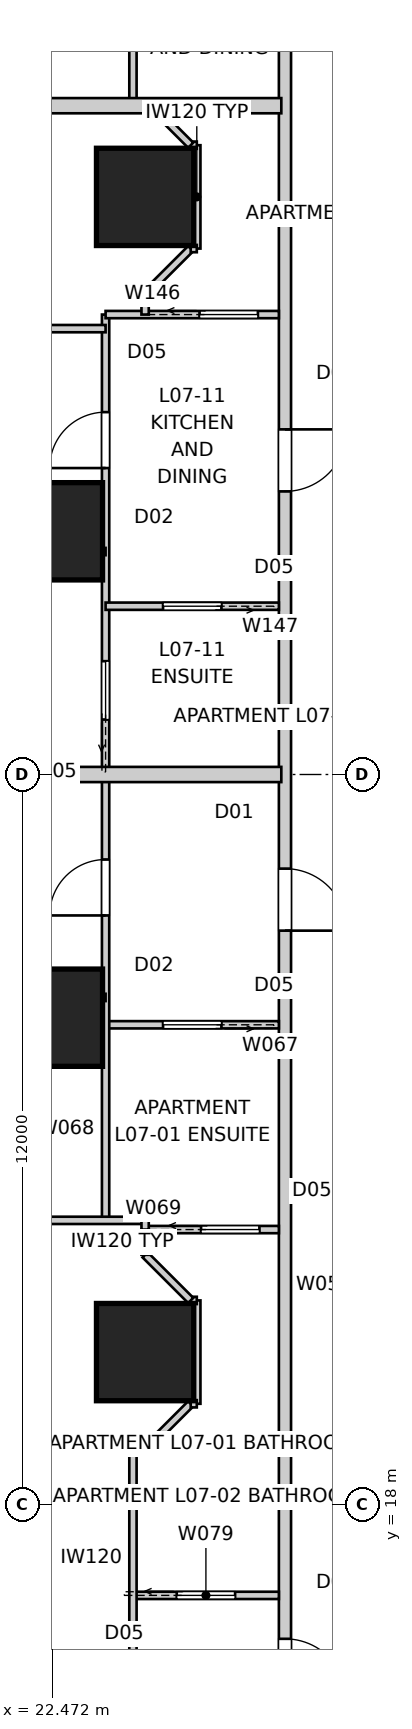
"""IFC4 building model, lengths in metres.
Left out: names, types, materials, properties, quantities, classifications, styles, units other than length and angle.
Written with IfcOpenShell. Run it as: python <this file> out.ifc"""

import sys

from ifc_helpers import new_model, si_unit, direction, frame, frame_2d, origin, origin_2d, place, context, subcontext, project, spatial, rectangle, extrude, element, fill, save


model = new_model("IFC4")
c1 = context("Model", 3, precision=1e-05, world=origin(), true_north=direction((0.0, 1.0)))
c2 = subcontext(c1, "Body", "Model", "MODEL_VIEW")
j1 = project(units=[si_unit("LENGTHUNIT", "METRE"), si_unit("PLANEANGLEUNIT", "RADIAN")], contexts=[c1])
p1 = place(None, origin())
s1 = spatial("IfcSite", under=j1, at=p1, CompositionType="ELEMENT")
p2 = place(p1, origin())
s2 = spatial("IfcBuilding", under=s1, at=p2, CompositionType="ELEMENT")
p3 = place(p2, frame((0.0, 0.0, 28.6)))
s3 = spatial("IfcBuildingStorey", under=s2, at=p3, CompositionType="ELEMENT", Elevation=28.6)
for number, where, z_axis, x_axis in (
    (1, (24.0, 39.5, 0.0), (0.0, 0.0, 1.0), (1.0, 0.0, 0.0)),
    (2, (22.5, 34.0, 0.0), (0.0, 0.0, 1.0), (1.0, 0.0, 0.0)),
    (3, (22.5, 26.0, 0.0), (0.0, 0.0, 1.0), (1.0, 0.0, 0.0)),
    (4, (24.0, 20.5, 0.0), (0.0, 0.0, 1.0), (1.0, 0.0, 0.0)),
):
    element("IfcColumn", number, at=place(p3, frame(where, z_axis=z_axis, x_axis=x_axis)), inside=s3, PredefinedType="COLUMN", context=c2, shape_type="SweptSolid", body=[
        extrude(rectangle(XDim=1.6, YDim=1.6, at=origin_2d()), origin(), (0.0, 0.0, 1.0), 3.4),
    ])
p4 = place(p3, frame((26.3, 46.3, 0.0), z_axis=(0.0, 0.0, 1.0), x_axis=(0.0, -1.0, 0.0)))
e5 = element("IfcWall", 5, at=p4, inside=s3, PredefinedType="PARTITIONING", context=c2, shape_type="SweptSolid", body=[
    extrude(rectangle(XDim=32.6, YDim=0.2, at=frame_2d((16.3, 0.0))), origin(), (0.0, 0.0, 1.0), 3.25),
])
p5 = place(p4, frame((2.315, 0.0, 0.0)))
e6 = element("IfcOpeningElement", 6, at=p5, cuts=e5, PredefinedType="OPENING", context=c2, shape_type="SweptSolid", body=[
    extrude(rectangle(XDim=1.02, YDim=2.34, at=frame_2d((0.51, 1.17))), frame((0.0, 0.11, 0.0), z_axis=(0.0, -1.0, 0.0), x_axis=(1.0, 0.0, 0.0)), (0.0, 0.0, 1.0), 0.22),
])
p6 = place(p4, frame((10.624, 0.0, 0.0)))
e7 = element("IfcOpeningElement", 7, at=p6, cuts=e5, PredefinedType="OPENING", context=c2, shape_type="SweptSolid", body=[
    extrude(rectangle(XDim=1.02, YDim=2.34, at=frame_2d((0.51, 1.17))), frame((0.0, 0.11, 0.0), z_axis=(0.0, -1.0, 0.0), x_axis=(1.0, 0.0, 0.0)), (0.0, 0.0, 1.0), 0.22),
])
p7 = place(p4, frame((17.848, 0.0, 0.0)))
e8 = element("IfcOpeningElement", 8, at=p7, cuts=e5, PredefinedType="OPENING", context=c2, shape_type="SweptSolid", body=[
    extrude(rectangle(XDim=1.02, YDim=2.34, at=frame_2d((0.51, 1.17))), frame((0.0, 0.11, 0.0), z_axis=(0.0, -1.0, 0.0), x_axis=(1.0, 0.0, 0.0)), (0.0, 0.0, 1.0), 0.22),
])
p8 = place(p4, frame((30.516, 0.0, 0.0)))
e9 = element("IfcOpeningElement", 9, at=p8, cuts=e5, PredefinedType="OPENING", context=c2, shape_type="SweptSolid", body=[
    extrude(rectangle(XDim=1.02, YDim=2.34, at=frame_2d((0.51, 1.17))), frame((0.0, 0.11, 0.0), z_axis=(0.0, -1.0, 0.0), x_axis=(1.0, 0.0, 0.0)), (0.0, 0.0, 1.0), 0.22),
])
for number, where, z_axis, x_axis in (
    (10, (14.0, 41.0, 0.0), (0.0, 0.0, 1.0), (1.0, 0.0, 0.0)),
    (11, (14.0, 19.0, 0.0), (0.0, 0.0, 1.0), (1.0, 0.0, 0.0)),
):
    element("IfcWall", number, at=place(p3, frame(where, z_axis=z_axis, x_axis=x_axis)), inside=s3, PredefinedType="PARTITIONING", context=c2, shape_type="SweptSolid", body=[
        extrude(rectangle(XDim=12.24, YDim=0.25, at=frame_2d((6.12, 0.0))), origin(), (0.0, 0.0, 1.0), 3.25),
    ])
p9 = place(p3, frame((14.0, 30.0, 0.0), z_axis=(0.0, 0.0, 1.0), x_axis=(1.0, 0.0, 0.0)))
e12 = element("IfcWall", 12, at=p9, inside=s3, PredefinedType="PARTITIONING", context=c2, shape_type="SweptSolid", body=[
    extrude(rectangle(XDim=8.5, YDim=0.25, at=frame_2d((4.25, 0.0))), origin(), (0.0, 0.0, 1.0), 3.25),
])
p10 = place(p3, frame((22.5, 30.0, 0.0), z_axis=(0.0, 0.0, 1.0), x_axis=(1.0, 0.0, 0.0)))
e13 = element("IfcWall", 13, at=p10, inside=s3, PredefinedType="PARTITIONING", context=c2, shape_type="SweptSolid", body=[
    extrude(rectangle(XDim=3.74, YDim=0.25, at=frame_2d((1.87, 0.0))), origin(), (0.0, 0.0, 1.0), 2.796),
])
p11 = place(p3, frame((26.2, 25.884, 0.0), z_axis=(0.0, 0.0, 1.0), x_axis=(-1.0, 0.0, 0.0)))
e14 = element("IfcWall", 14, at=p11, inside=s3, PredefinedType="PARTITIONING", context=c2, shape_type="SweptSolid", body=[
    extrude(rectangle(XDim=2.85, YDim=0.12, at=frame_2d((1.425, 0.0))), origin(), (0.0, 0.0, 1.0), 3.25),
])
p12 = place(p11, frame((0.945, 0.0, 0.0)))
e15 = element("IfcOpeningElement", 15, at=p12, cuts=e14, PredefinedType="OPENING", context=c2, shape_type="SweptSolid", body=[
    extrude(rectangle(XDim=0.96, YDim=2.1, at=frame_2d((0.48, 1.05))), frame((0.0, 0.07, 0.0), z_axis=(0.0, -1.0, 0.0), x_axis=(1.0, 0.0, 0.0)), (0.0, 0.0, 1.0), 0.14),
])
p13 = place(p3, frame((23.35, 22.667, 0.0), z_axis=(0.0, 0.0, 1.0), x_axis=(0.0, 1.0, 0.0)))
e16 = element("IfcWall", 16, at=p13, inside=s3, PredefinedType="PARTITIONING", context=c2, shape_type="SweptSolid", body=[
    extrude(rectangle(XDim=14.898, YDim=0.12, at=frame_2d((7.449, 0.0))), origin(), (0.0, 0.0, 1.0), 2.55),
])
p14 = place(p13, frame((12.373, 0.0, 0.0)))
e17 = element("IfcOpeningElement", 17, at=p14, cuts=e16, PredefinedType="OPENING", context=c2, shape_type="SweptSolid", body=[
    extrude(rectangle(XDim=0.92, YDim=2.34, at=frame_2d((0.46, 1.17))), frame((0.0, 0.07, 0.0), z_axis=(0.0, -1.0, 0.0), x_axis=(1.0, 0.0, 0.0)), (0.0, 0.0, 1.0), 0.14),
])
p15 = place(p13, frame((5.015, 0.0, 0.0)))
e18 = element("IfcOpeningElement", 18, at=p15, cuts=e16, PredefinedType="OPENING", context=c2, shape_type="SweptSolid", body=[
    extrude(rectangle(XDim=0.92, YDim=2.34, at=frame_2d((0.46, 1.17))), frame((0.0, 0.07, 0.0), z_axis=(0.0, -1.0, 0.0), x_axis=(1.0, 0.0, 0.0)), (0.0, 0.0, 1.0), 0.14),
])
p16 = place(p13, frame((8.237, 0.0, 0.0)))
e19 = element("IfcOpeningElement", 19, at=p16, cuts=e16, PredefinedType="OPENING", context=c2, shape_type="SweptSolid", body=[
    extrude(rectangle(XDim=0.96, YDim=2.1, at=frame_2d((0.48, 1.05))), frame((0.0, 0.07, 0.0), z_axis=(0.0, -1.0, 0.0), x_axis=(1.0, 0.0, 0.0)), (0.0, 0.0, 1.0), 0.14),
])
p17 = place(p3, frame((24.0, 22.515, 0.0), z_axis=(0.0, 0.0, 1.0), x_axis=(1.0, 0.0, 0.0)))
e20 = element("IfcWall", 20, at=p17, inside=s3, PredefinedType="PARTITIONING", context=c2, shape_type="SweptSolid", body=[
    extrude(rectangle(XDim=2.2, YDim=0.12, at=frame_2d((1.1, 0.0))), origin(), (0.0, 0.0, 1.0), 3.25),
])
p18 = place(p17, frame((0.92, 0.0, 0.0)))
e21 = element("IfcOpeningElement", 21, at=p18, cuts=e20, PredefinedType="OPENING", context=c2, shape_type="SweptSolid", body=[
    extrude(rectangle(XDim=0.96, YDim=2.1, at=frame_2d((0.48, 1.05))), frame((0.0, 0.07, 0.0), z_axis=(0.0, -1.0, 0.0), x_axis=(1.0, 0.0, 0.0)), (0.0, 0.0, 1.0), 0.14),
])
p19 = place(p3, frame((24.1, 19.0, 0.0), z_axis=(0.0, 0.0, 1.0), x_axis=(0.707106781187, 0.707106781187, 0.0)))
e22 = element("IfcWall", 22, at=p19, inside=s3, PredefinedType="PARTITIONING", context=c2, shape_type="SweptSolid", body=[
    extrude(rectangle(XDim=0.919, YDim=0.12, at=frame_2d((0.459, 0.0))), origin(), (0.0, 0.0, 1.0), 3.25),
])
p20 = place(p3, frame((24.85, 19.65, 0.0), z_axis=(0.0, 0.0, 1.0), x_axis=(0.0, 1.0, 0.0)))
e23 = element("IfcWall", 23, at=p20, inside=s3, PredefinedType="PARTITIONING", context=c2, shape_type="SweptSolid", body=[
    extrude(rectangle(XDim=1.7, YDim=0.12, at=frame_2d((0.85, 0.0))), origin(), (0.0, 0.0, 1.0), 3.25),
])
p21 = place(p3, frame((24.75, 21.35, 0.0), z_axis=(0.0, 0.0, 1.0), x_axis=(-0.707106781187, 0.707106781187, 0.0)))
e24 = element("IfcWall", 24, at=p21, inside=s3, PredefinedType="PARTITIONING", context=c2, shape_type="SweptSolid", body=[
    extrude(rectangle(XDim=1.061, YDim=0.12, at=frame_2d((0.53, 0.0))), origin(), (0.0, 0.0, 1.0), 3.25),
])
p22 = place(p3, frame((24.0, 22.1, 0.0), z_axis=(0.0, 0.0, 1.0), x_axis=(0.0, 1.0, 0.0)))
e25 = element("IfcWall", 25, at=p22, inside=s3, PredefinedType="PARTITIONING", context=c2, shape_type="SweptSolid", body=[
    extrude(rectangle(XDim=0.415, YDim=0.12, at=frame_2d((0.208, 0.0))), origin(), (0.0, 0.0, 1.0), 3.25),
])
p23 = place(p3, frame((24.0, 22.667, 0.0), z_axis=(0.0, 0.0, 1.0), x_axis=(-1.0, 0.0, 0.0)))
e26 = element("IfcWall", 26, at=p23, inside=s3, PredefinedType="PARTITIONING", context=c2, shape_type="SweptSolid", body=[
    extrude(rectangle(XDim=9.96, YDim=0.12, at=frame_2d((4.98, 0.0))), origin(), (0.0, 0.0, 1.0), 3.25),
])
p24 = place(p23, frame((4.84, 0.0, 0.0)))
e27 = element("IfcOpeningElement", 27, at=p24, cuts=e26, PredefinedType="OPENING", context=c2, shape_type="SweptSolid", body=[
    extrude(rectangle(XDim=0.92, YDim=2.34, at=frame_2d((0.46, 1.17))), frame((0.0, 0.07, 0.0), z_axis=(0.0, -1.0, 0.0), x_axis=(1.0, 0.0, 0.0)), (0.0, 0.0, 1.0), 0.14),
])
p25 = place(p3, frame((23.35, 26.333, 0.0), z_axis=(0.0, 0.0, 1.0), x_axis=(-1.0, 0.0, 0.0)))
e28 = element("IfcWall", 28, at=p25, inside=s3, PredefinedType="PARTITIONING", context=c2, shape_type="SweptSolid", body=[
    extrude(rectangle(XDim=9.31, YDim=0.12, at=frame_2d((4.655, 0.0))), origin(), (0.0, 0.0, 1.0), 3.25),
])
p26 = place(p25, frame((4.215, 0.0, 0.0)))
e29 = element("IfcOpeningElement", 29, at=p26, cuts=e28, PredefinedType="OPENING", context=c2, shape_type="SweptSolid", body=[
    extrude(rectangle(XDim=0.92, YDim=2.34, at=frame_2d((0.46, 1.17))), frame((0.0, 0.07, 0.0), z_axis=(0.0, -1.0, 0.0), x_axis=(1.0, 0.0, 0.0)), (0.0, 0.0, 1.0), 0.14),
])
p27 = place(p3, frame((23.8, 16.499, 0.0), z_axis=(0.0, 0.0, 1.0), x_axis=(1.0, 0.0, 0.0)))
e30 = element("IfcWall", 30, at=p27, inside=s3, PredefinedType="PARTITIONING", context=c2, shape_type="SweptSolid", body=[
    extrude(rectangle(XDim=2.4, YDim=0.12, at=frame_2d((1.2, 0.0))), origin(), (0.0, 0.0, 1.0), 3.25),
])
p28 = place(p27, frame((0.72, 0.0, 0.0)))
e31 = element("IfcOpeningElement", 31, at=p28, cuts=e30, PredefinedType="OPENING", context=c2, shape_type="SweptSolid", body=[
    extrude(rectangle(XDim=0.96, YDim=2.1, at=frame_2d((0.48, 1.05))), frame((0.0, 0.07, 0.0), z_axis=(0.0, -1.0, 0.0), x_axis=(1.0, 0.0, 0.0)), (0.0, 0.0, 1.0), 0.14),
])
p29 = place(p3, frame((23.8, 15.233, 0.0), z_axis=(0.0, 0.0, 1.0), x_axis=(0.0, 1.0, 0.0)))
e32 = element("IfcWall", 32, at=p29, inside=s3, PredefinedType="PARTITIONING", context=c2, shape_type="SweptSolid", body=[
    extrude(rectangle(XDim=3.767, YDim=0.12, at=frame_2d((1.883, 0.0))), origin(), (0.0, 0.0, 1.0), 3.25),
])
p30 = place(p3, frame((23.8, 41.0, 0.0), z_axis=(0.0, 0.0, 1.0), x_axis=(0.0, 1.0, 0.0)))
e33 = element("IfcWall", 33, at=p30, inside=s3, PredefinedType="PARTITIONING", context=c2, shape_type="SweptSolid", body=[
    extrude(rectangle(XDim=7.333, YDim=0.12, at=frame_2d((3.667, 0.0))), origin(), (0.0, 0.0, 1.0), 3.25),
])
p31 = place(p30, frame((3.207, 0.0, 0.0)))
e34 = element("IfcOpeningElement", 34, at=p31, cuts=e33, PredefinedType="OPENING", context=c2, shape_type="SweptSolid", body=[
    extrude(rectangle(XDim=0.92, YDim=2.34, at=frame_2d((0.46, 1.17))), frame((0.0, 0.07, 0.0), z_axis=(0.0, -1.0, 0.0), x_axis=(1.0, 0.0, 0.0)), (0.0, 0.0, 1.0), 0.14),
])
p32 = place(p3, frame((23.35, 37.565, 0.0), z_axis=(0.0, 0.0, 1.0), x_axis=(1.0, 0.0, 0.0)))
e35 = element("IfcWall", 35, at=p32, inside=s3, PredefinedType="PARTITIONING", context=c2, shape_type="SweptSolid", body=[
    extrude(rectangle(XDim=2.85, YDim=0.12, at=frame_2d((1.425, 0.0))), origin(), (0.0, 0.0, 1.0), 3.25),
])
p33 = place(p32, frame((1.545, 0.0, 0.0)))
e36 = element("IfcOpeningElement", 36, at=p33, cuts=e35, PredefinedType="OPENING", context=c2, shape_type="SweptSolid", body=[
    extrude(rectangle(XDim=0.96, YDim=2.1, at=frame_2d((0.48, 1.05))), frame((0.0, 0.07, 0.0), z_axis=(0.0, -1.0, 0.0), x_axis=(1.0, 0.0, 0.0)), (0.0, 0.0, 1.0), 0.14),
])
p34 = place(p3, frame((26.2, 32.768, 0.0), z_axis=(0.0, 0.0, 1.0), x_axis=(-1.0, 0.0, 0.0)))
e37 = element("IfcWall", 37, at=p34, inside=s3, PredefinedType="PARTITIONING", context=c2, shape_type="SweptSolid", body=[
    extrude(rectangle(XDim=2.85, YDim=0.12, at=frame_2d((1.425, 0.0))), origin(), (0.0, 0.0, 1.0), 3.25),
])
p35 = place(p34, frame((0.945, 0.0, 0.0)))
e38 = element("IfcOpeningElement", 38, at=p35, cuts=e37, PredefinedType="OPENING", context=c2, shape_type="SweptSolid", body=[
    extrude(rectangle(XDim=0.96, YDim=2.1, at=frame_2d((0.48, 1.05))), frame((0.0, 0.07, 0.0), z_axis=(0.0, -1.0, 0.0), x_axis=(1.0, 0.0, 0.0)), (0.0, 0.0, 1.0), 0.14),
])
p36 = place(p3, frame((24.0, 37.565, 0.0), z_axis=(0.0, 0.0, 1.0), x_axis=(0.0, 1.0, 0.0)))
e39 = element("IfcWall", 39, at=p36, inside=s3, PredefinedType="PARTITIONING", context=c2, shape_type="SweptSolid", body=[
    extrude(rectangle(XDim=0.335, YDim=0.12, at=frame_2d((0.167, 0.0))), origin(), (0.0, 0.0, 1.0), 3.25),
])
p37 = place(p3, frame((24.0, 37.9, 0.0), z_axis=(0.0, 0.0, 1.0), x_axis=(0.707106781187, 0.707106781187, 0.0)))
e40 = element("IfcWall", 40, at=p37, inside=s3, PredefinedType="PARTITIONING", context=c2, shape_type="SweptSolid", body=[
    extrude(rectangle(XDim=1.061, YDim=0.12, at=frame_2d((0.53, 0.0))), origin(), (0.0, 0.0, 1.0), 3.25),
])
p38 = place(p3, frame((24.85, 38.65, 0.0), z_axis=(0.0, 0.0, 1.0), x_axis=(0.0, 1.0, 0.0)))
e41 = element("IfcWall", 41, at=p38, inside=s3, PredefinedType="PARTITIONING", context=c2, shape_type="SweptSolid", body=[
    extrude(rectangle(XDim=1.7, YDim=0.12, at=frame_2d((0.85, 0.0))), origin(), (0.0, 0.0, 1.0), 3.25),
])
p39 = place(p3, frame((24.75, 40.35, 0.0), z_axis=(0.0, 0.0, 1.0), x_axis=(-0.707106781187, 0.707106781187, 0.0)))
e42 = element("IfcWall", 42, at=p39, inside=s3, PredefinedType="PARTITIONING", context=c2, shape_type="SweptSolid", body=[
    extrude(rectangle(XDim=0.919, YDim=0.12, at=frame_2d((0.459, 0.0))), origin(), (0.0, 0.0, 1.0), 3.25),
])
p40 = place(p3, frame((23.35, 37.333, 0.0), z_axis=(0.0, 0.0, 1.0), x_axis=(-1.0, 0.0, 0.0)))
e43 = element("IfcWall", 43, at=p40, inside=s3, PredefinedType="PARTITIONING", context=c2, shape_type="SweptSolid", body=[
    extrude(rectangle(XDim=9.31, YDim=0.12, at=frame_2d((4.655, 0.0))), origin(), (0.0, 0.0, 1.0), 3.25),
])
p41 = place(p40, frame((4.215, 0.0, 0.0)))
e44 = element("IfcOpeningElement", 44, at=p41, cuts=e43, PredefinedType="OPENING", context=c2, shape_type="SweptSolid", body=[
    extrude(rectangle(XDim=0.92, YDim=2.34, at=frame_2d((0.46, 1.17))), frame((0.0, 0.07, 0.0), z_axis=(0.0, -1.0, 0.0), x_axis=(1.0, 0.0, 0.0)), (0.0, 0.0, 1.0), 0.14),
])
p42 = place(p3, frame((14.04, 33.667, 0.0), z_axis=(0.0, 0.0, 1.0), x_axis=(1.0, 0.0, 0.0)))
e45 = element("IfcWall", 45, at=p42, inside=s3, PredefinedType="PARTITIONING", context=c2, shape_type="SweptSolid", body=[
    extrude(rectangle(XDim=9.31, YDim=0.12, at=frame_2d((4.655, 0.0))), origin(), (0.0, 0.0, 1.0), 3.25),
])
for number, where, z_axis, x_axis in (
    (46, (24.85, 19.65, 0.0), (0.0, 0.0, 1.0), (-1.0, 0.0, 0.0)),
    (47, (24.85, 21.35, 0.0), (0.0, 0.0, 1.0), (-1.0, 0.0, 0.0)),
):
    element("IfcWall", number, at=place(p3, frame(where, z_axis=z_axis, x_axis=x_axis)), inside=s3, PredefinedType="PARTITIONING", context=c2, shape_type="SweptSolid", body=[
        extrude(rectangle(XDim=0.1, YDim=0.12, at=frame_2d((0.05, 0.0))), origin(), (0.0, 0.0, 1.0), 3.25),
    ])
p43 = place(p3, frame((24.0, 22.667, 0.0), z_axis=(0.0, 0.0, 1.0), x_axis=(0.0, -1.0, 0.0)))
e48 = element("IfcWall", 48, at=p43, inside=s3, PredefinedType="PARTITIONING", context=c2, shape_type="SweptSolid", body=[
    extrude(rectangle(XDim=0.151, YDim=0.12, at=frame_2d((0.076, 0.0))), origin(), (0.0, 0.0, 1.0), 3.25),
])
for number, where, z_axis, x_axis in (
    (49, (24.85, 38.65, 0.0), (0.0, 0.0, 1.0), (-1.0, 0.0, 0.0)),
    (50, (24.85, 40.35, 0.0), (0.0, 0.0, 1.0), (-1.0, 0.0, 0.0)),
):
    element("IfcWall", number, at=place(p3, frame(where, z_axis=z_axis, x_axis=x_axis)), inside=s3, PredefinedType="PARTITIONING", context=c2, shape_type="SweptSolid", body=[
        extrude(rectangle(XDim=0.1, YDim=0.12, at=frame_2d((0.05, 0.0))), origin(), (0.0, 0.0, 1.0), 3.25),
    ])
p44 = place(p6, origin())
e51 = element("IfcDoor", 51, at=p44, inside=s3, OperationType="SINGLE_SWING_LEFT", PredefinedType="DOOR", context=c2, shape_type="SweptSolid", body=[
    extrude(rectangle(XDim=1.02, YDim=2.34, at=frame_2d((0.51, 1.17))), frame((0.0, 0.025, 0.0), z_axis=(0.0, -1.0, 0.0), x_axis=(1.0, 0.0, 0.0)), (0.0, 0.0, 1.0), 0.05),
])
fill(e7, e51)
p45 = place(p7, origin())
e52 = element("IfcDoor", 52, at=p45, inside=s3, OperationType="SINGLE_SWING_RIGHT", PredefinedType="DOOR", context=c2, shape_type="SweptSolid", body=[
    extrude(rectangle(XDim=1.02, YDim=2.34, at=frame_2d((0.51, 1.17))), frame((0.0, 0.025, 0.0), z_axis=(0.0, -1.0, 0.0), x_axis=(1.0, 0.0, 0.0)), (0.0, 0.0, 1.0), 0.05),
])
fill(e8, e52)
p46 = place(p8, origin())
e53 = element("IfcDoor", 53, at=p46, inside=s3, OperationType="SINGLE_SWING_RIGHT", PredefinedType="DOOR", context=c2, shape_type="SweptSolid", body=[
    extrude(rectangle(XDim=1.02, YDim=2.34, at=frame_2d((0.51, 1.17))), frame((0.0, 0.025, 0.0), z_axis=(0.0, -1.0, 0.0), x_axis=(1.0, 0.0, 0.0)), (0.0, 0.0, 1.0), 0.05),
])
fill(e9, e53)
p47 = place(p14, origin())
e54 = element("IfcDoor", 54, at=p47, inside=s3, OperationType="SINGLE_SWING_LEFT", PredefinedType="DOOR", context=c2, shape_type="SweptSolid", body=[
    extrude(rectangle(XDim=0.92, YDim=2.34, at=frame_2d((0.46, 1.17))), frame((0.0, 0.025, 0.0), z_axis=(0.0, -1.0, 0.0), x_axis=(1.0, 0.0, 0.0)), (0.0, 0.0, 1.0), 0.05),
])
fill(e17, e54)
p48 = place(p35, origin())
e55 = element("IfcDoor", 55, at=p48, inside=s3, OperationType="SLIDING_TO_LEFT", PredefinedType="DOOR", context=c2, shape_type="SweptSolid", body=[
    extrude(rectangle(XDim=0.96, YDim=2.1, at=frame_2d((0.48, 1.05))), frame((0.0, 0.025, 0.0), z_axis=(0.0, -1.0, 0.0), x_axis=(1.0, 0.0, 0.0)), (0.0, 0.0, 1.0), 0.05),
])
fill(e38, e55)
p49 = place(p33, origin())
e56 = element("IfcDoor", 56, at=p49, inside=s3, OperationType="SLIDING_TO_LEFT", PredefinedType="DOOR", context=c2, shape_type="SweptSolid", body=[
    extrude(rectangle(XDim=0.96, YDim=2.1, at=frame_2d((0.48, 1.05))), frame((0.0, 0.025, 0.0), z_axis=(0.0, -1.0, 0.0), x_axis=(1.0, 0.0, 0.0)), (0.0, 0.0, 1.0), 0.05),
])
fill(e36, e56)
p50 = place(p15, origin())
e57 = element("IfcDoor", 57, at=p50, inside=s3, OperationType="SINGLE_SWING_LEFT", PredefinedType="DOOR", context=c2, shape_type="SweptSolid", body=[
    extrude(rectangle(XDim=0.92, YDim=2.34, at=frame_2d((0.46, 1.17))), frame((0.0, 0.025, 0.0), z_axis=(0.0, -1.0, 0.0), x_axis=(1.0, 0.0, 0.0)), (0.0, 0.0, 1.0), 0.05),
])
fill(e18, e57)
p51 = place(p12, origin())
e58 = element("IfcDoor", 58, at=p51, inside=s3, OperationType="SLIDING_TO_LEFT", PredefinedType="DOOR", context=c2, shape_type="SweptSolid", body=[
    extrude(rectangle(XDim=0.96, YDim=2.1, at=frame_2d((0.48, 1.05))), frame((0.0, 0.025, 0.0), z_axis=(0.0, -1.0, 0.0), x_axis=(1.0, 0.0, 0.0)), (0.0, 0.0, 1.0), 0.05),
])
fill(e15, e58)
p52 = place(p28, origin())
e59 = element("IfcDoor", 59, at=p52, inside=s3, OperationType="SLIDING_TO_LEFT", PredefinedType="DOOR", context=c2, shape_type="SweptSolid", body=[
    extrude(rectangle(XDim=0.96, YDim=2.1, at=frame_2d((0.48, 1.05))), frame((0.0, 0.025, 0.0), z_axis=(0.0, -1.0, 0.0), x_axis=(1.0, 0.0, 0.0)), (0.0, 0.0, 1.0), 0.05),
])
fill(e31, e59)
p53 = place(p16, origin())
e60 = element("IfcDoor", 60, at=p53, inside=s3, OperationType="SLIDING_TO_LEFT", PredefinedType="DOOR", context=c2, shape_type="SweptSolid", body=[
    extrude(rectangle(XDim=0.96, YDim=2.1, at=frame_2d((0.48, 1.05))), frame((0.0, 0.025, 0.0), z_axis=(0.0, -1.0, 0.0), x_axis=(1.0, 0.0, 0.0)), (0.0, 0.0, 1.0), 0.05),
])
fill(e19, e60)
p54 = place(p18, origin())
e61 = element("IfcDoor", 61, at=p54, inside=s3, OperationType="SLIDING_TO_LEFT", PredefinedType="DOOR", context=c2, shape_type="SweptSolid", body=[
    extrude(rectangle(XDim=0.96, YDim=2.1, at=frame_2d((0.48, 1.05))), frame((0.0, 0.025, 0.0), z_axis=(0.0, -1.0, 0.0), x_axis=(1.0, 0.0, 0.0)), (0.0, 0.0, 1.0), 0.05),
])
fill(e21, e61)
save(model, sys.argv[1])
